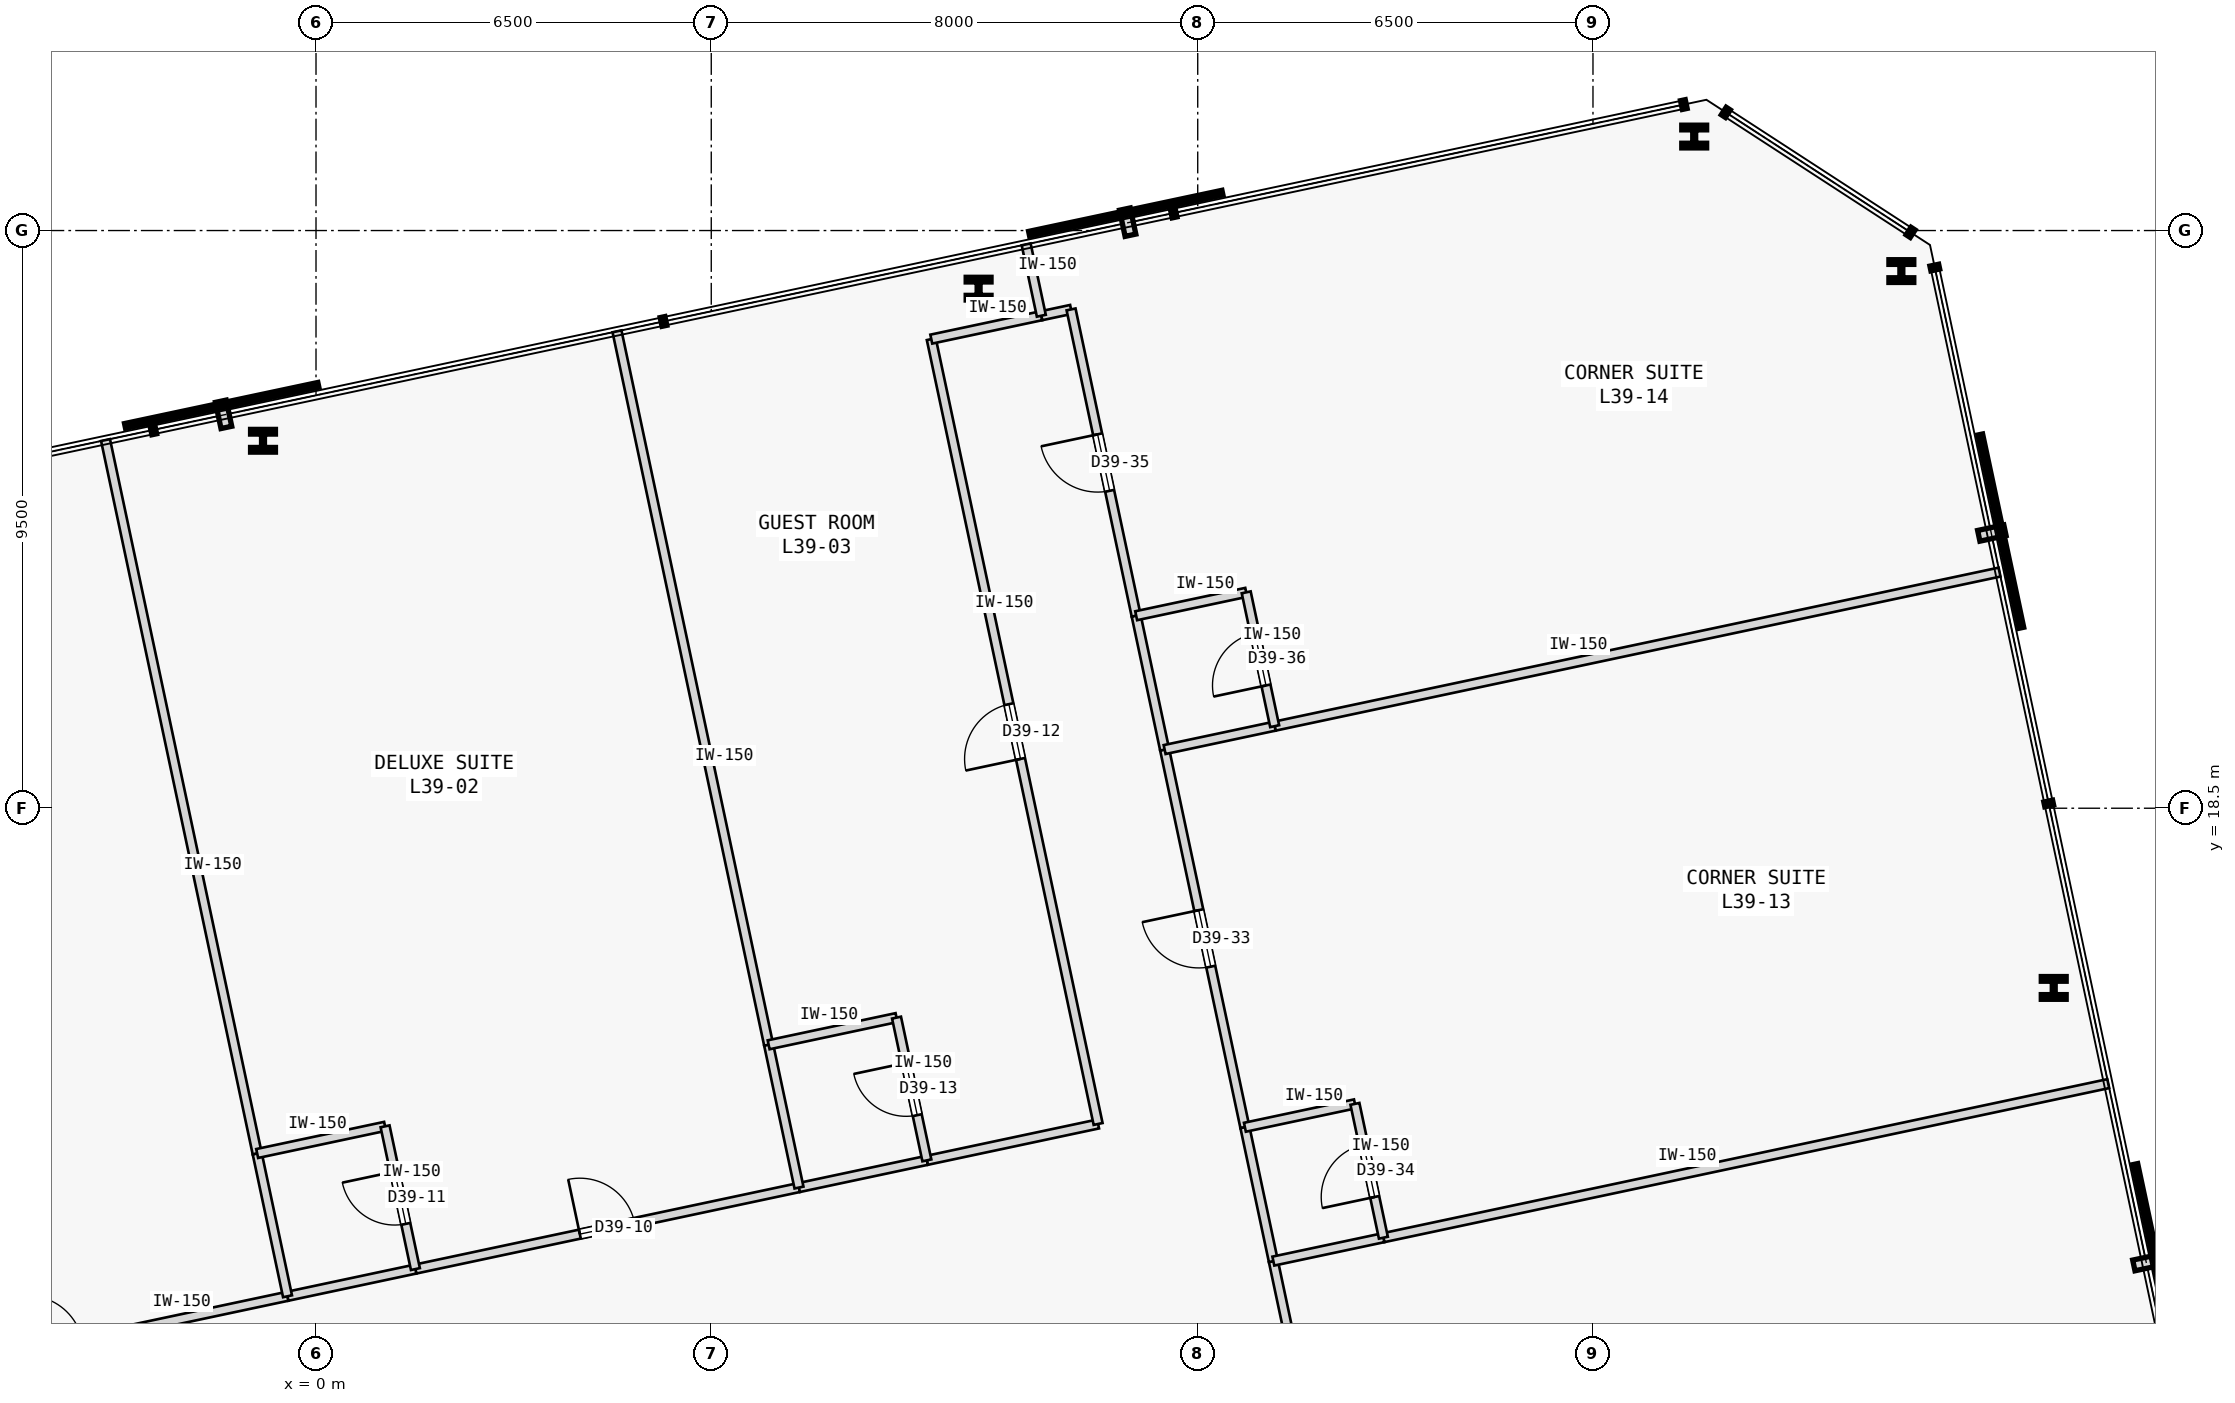
"""IFC4 building model, lengths in metres.
Left out: names, types, materials, properties, quantities, classifications, styles, units other than length and angle.
Written with IfcOpenShell. Run it as: python <this file> out.ifc"""

import sys

from ifc_helpers import new_model, si_unit, direction, frame, frame_2d, origin, origin_2d, place, context, subcontext, project, spatial, rectangle, i_section, extrude, element, fill, save


model = new_model("IFC4")
c1 = context("Model", 3, precision=1e-05, world=origin(), true_north=direction((0.0, 1.0)))
c2 = subcontext(c1, "Body", "Model", "MODEL_VIEW")
j1 = project(units=[si_unit("LENGTHUNIT", "METRE"), si_unit("PLANEANGLEUNIT", "RADIAN")], contexts=[c1])
p1 = place(None, origin())
s1 = spatial("IfcSite", under=j1, at=p1, CompositionType="ELEMENT")
p2 = place(p1, origin())
s2 = spatial("IfcBuilding", under=s1, at=p2, CompositionType="ELEMENT")
p3 = place(p2, frame((0.0, 0.0, 154.8)))
s3 = spatial("IfcBuildingStorey", under=s2, at=p3, CompositionType="ELEMENT", Elevation=154.8)
for number, where, z_axis, x_axis in (
    (1, (28.577, 15.545, 0.0), (0.0, 0.0, 1.0), (1.0, 0.0, 0.0)),
    (2, (26.071, 27.333, 0.0), (0.0, 0.0, 1.0), (1.0, 0.0, 0.0)),
    (3, (22.665, 29.546, 0.0), (0.0, 0.0, 1.0), (1.0, 0.0, 0.0)),
    (4, (10.896, 27.044, 0.0), (0.0, 0.0, 1.0), (1.0, 0.0, 0.0)),
    (5, (-0.872, 24.543, 0.0), (0.0, 0.0, 1.0), (1.0, 0.0, 0.0)),
):
    element("IfcColumn", number, at=place(p3, frame(where, z_axis=z_axis, x_axis=x_axis)), inside=s3, PredefinedType="COLUMN", context=c2, shape_type="SweptSolid", body=[
        extrude(i_section(OverallWidth=0.409, OverallDepth=0.374, WebThickness=0.048, FlangeThickness=0.077, FilletRadius=0.015, at=origin_2d()), origin(), (0.0, 0.0, 1.0), 3.4),
    ])
p4 = place(p3, frame((-8.121, 8.848, 0.0), z_axis=(0.0, 0.0, 1.0), x_axis=(0.978146318695, 0.207917722244, 0.0)))
e6 = element("IfcWall", 6, at=p4, inside=s3, PredefinedType="PARTITIONING", context=c2, shape_type="SweptSolid", body=[
    extrude(rectangle(XDim=7.824, YDim=0.15, at=frame_2d((3.912, 0.0))), origin(), (0.0, 0.0, 1.0), 3.175),
])
p5 = place(p4, frame((3.452, 0.0, 0.0)))
e7 = element("IfcOpeningElement", 7, at=p5, cuts=e6, PredefinedType="OPENING", context=c2, shape_type="SweptSolid", body=[
    extrude(rectangle(XDim=0.92, YDim=2.15, at=frame_2d((0.46, 1.075))), frame((0.0, 0.085, 0.0), z_axis=(0.0, -1.0, 0.0), x_axis=(1.0, 0.0, 0.0)), (0.0, 0.0, 1.0), 0.17),
])
p6 = place(p3, frame((1.635, 10.921, 0.0), z_axis=(0.0, 0.0, 1.0), x_axis=(0.978147881284, 0.207910370927, 0.0)))
e8 = element("IfcWall", 8, at=p6, inside=s3, PredefinedType="PARTITIONING", context=c2, shape_type="SweptSolid", body=[
    extrude(rectangle(XDim=6.449, YDim=0.15, at=frame_2d((3.225, 0.0))), origin(), (0.0, 0.0, 1.0), 3.175),
])
p7 = place(p6, frame((2.764, 0.0, 0.0)))
e9 = element("IfcOpeningElement", 9, at=p7, cuts=e8, PredefinedType="OPENING", context=c2, shape_type="SweptSolid", body=[
    extrude(rectangle(XDim=0.92, YDim=2.15, at=frame_2d((0.46, 1.075))), frame((0.0, 0.085, 0.0), z_axis=(0.0, -1.0, 0.0), x_axis=(1.0, 0.0, 0.0)), (0.0, 0.0, 1.0), 0.17),
])
p8 = place(p3, frame((-0.469, 10.474, 0.0), z_axis=(0.0, 0.0, 1.0), x_axis=(0.978146728319, 0.207915795165, 0.0)))
e10 = element("IfcWall", 10, at=p8, inside=s3, PredefinedType="PARTITIONING", context=c2, shape_type="SweptSolid", body=[
    extrude(rectangle(XDim=2.15, YDim=0.15, at=frame_2d((1.075, 0.0))), origin(), (0.0, 0.0, 1.0), 3.175),
])
p9 = place(p3, frame((10.046, 12.709, 0.0), z_axis=(0.0, 0.0, 1.0), x_axis=(0.97816208355, 0.207843542851, 0.0)))
e11 = element("IfcWall", 11, at=p9, inside=s3, PredefinedType="PARTITIONING", context=c2, shape_type="SweptSolid", body=[
    extrude(rectangle(XDim=2.879, YDim=0.15, at=frame_2d((1.439, 0.0))), origin(), (0.0, 0.0, 1.0), 3.175),
])
p10 = place(p3, frame((12.862, 13.308, 0.0), z_axis=(0.0, 0.0, 1.0), x_axis=(-0.207911421929, 0.978147657888, 0.0)))
e12 = element("IfcWall", 12, at=p10, inside=s3, PredefinedType="PARTITIONING", context=c2, shape_type="SweptSolid", body=[
    extrude(rectangle(XDim=13.195, YDim=0.15, at=frame_2d((6.598, 0.0))), origin(), (0.0, 0.0, 1.0), 3.175),
])
p11 = place(p10, frame((6.137, 0.0, 0.0)))
e13 = element("IfcOpeningElement", 13, at=p11, cuts=e12, PredefinedType="OPENING", context=c2, shape_type="SweptSolid", body=[
    extrude(rectangle(XDim=0.92, YDim=2.15, at=frame_2d((0.46, 1.075))), frame((0.0, 0.085, 0.0), z_axis=(0.0, -1.0, 0.0), x_axis=(1.0, 0.0, 0.0)), (0.0, 0.0, 1.0), 0.17),
])
p12 = place(p3, frame((10.118, 26.214, 0.0), z_axis=(0.0, 0.0, 1.0), x_axis=(0.978133353907, 0.20797870558, 0.0)))
e14 = element("IfcWall", 14, at=p12, inside=s3, PredefinedType="PARTITIONING", context=c2, shape_type="SweptSolid", body=[
    extrude(rectangle(XDim=1.85, YDim=0.15, at=frame_2d((0.925, 0.0))), origin(), (0.0, 0.0, 1.0), 3.175),
])
p13 = place(p3, frame((7.943, 12.262, 0.0), z_axis=(0.0, 0.0, 1.0), x_axis=(0.978146728319, 0.207915795165, 0.0)))
e15 = element("IfcWall", 15, at=p13, inside=s3, PredefinedType="PARTITIONING", context=c2, shape_type="SweptSolid", body=[
    extrude(rectangle(XDim=2.15, YDim=0.15, at=frame_2d((1.075, 0.0))), origin(), (0.0, 0.0, 1.0), 3.175),
])
p14 = place(p3, frame((17.064, 4.841, 0.0), z_axis=(0.0, 0.0, 1.0), x_axis=(-0.207924511115, 0.978144875608, 0.0)))
e16 = element("IfcWall", 16, at=p14, inside=s3, PredefinedType="PARTITIONING", context=c2, shape_type="SweptSolid", body=[
    extrude(rectangle(XDim=6.35, YDim=0.15, at=frame_2d((3.175, 0.0))), origin(), (0.0, 0.0, 1.0), 3.175),
])
p15 = place(p14, frame((2.7, 0.0, 0.0)))
e17 = element("IfcOpeningElement", 17, at=p15, cuts=e16, PredefinedType="OPENING", context=c2, shape_type="SweptSolid", body=[
    extrude(rectangle(XDim=0.95, YDim=2.15, at=frame_2d((0.475, 1.075))), frame((0.0, 0.085, 0.0), z_axis=(0.0, -1.0, 0.0), x_axis=(1.0, 0.0, 0.0)), (0.0, 0.0, 1.0), 0.17),
])
p16 = place(p3, frame((15.276, 13.253, 0.0), z_axis=(0.0, 0.0, 1.0), x_axis=(-0.207924511115, 0.978144875608, 0.0)))
e18 = element("IfcWall", 18, at=p16, inside=s3, PredefinedType="PARTITIONING", context=c2, shape_type="SweptSolid", body=[
    extrude(rectangle(XDim=6.35, YDim=0.15, at=frame_2d((3.175, 0.0))), origin(), (0.0, 0.0, 1.0), 3.175),
])
p17 = place(p16, frame((2.7, 0.0, 0.0)))
e19 = element("IfcOpeningElement", 19, at=p17, cuts=e18, PredefinedType="OPENING", context=c2, shape_type="SweptSolid", body=[
    extrude(rectangle(XDim=0.95, YDim=2.15, at=frame_2d((0.475, 1.075))), frame((0.0, 0.085, 0.0), z_axis=(0.0, -1.0, 0.0), x_axis=(1.0, 0.0, 0.0)), (0.0, 0.0, 1.0), 0.17),
])
p18 = place(p3, frame((15.744, 11.052, 0.0), z_axis=(0.0, 0.0, 1.0), x_axis=(-0.207891197838, 0.978151956427, 0.0)))
e20 = element("IfcWall", 20, at=p18, inside=s3, PredefinedType="PARTITIONING", context=c2, shape_type="SweptSolid", body=[
    extrude(rectangle(XDim=2.25, YDim=0.15, at=frame_2d((1.125, 0.0))), origin(), (0.0, 0.0, 1.0), 3.175),
])
p19 = place(p3, frame((11.928, 26.599, 0.0), z_axis=(0.0, 0.0, 1.0), x_axis=(0.97822210712, 0.207560856478, 0.0)))
e21 = element("IfcWall", 21, at=p19, inside=s3, PredefinedType="PARTITIONING", context=c2, shape_type="SweptSolid", body=[
    extrude(rectangle(XDim=0.5, YDim=0.15, at=frame_2d((0.25, 0.0))), origin(), (0.0, 0.0, 1.0), 3.175),
])
p20 = place(p3, frame((13.488, 21.666, 0.0), z_axis=(0.0, 0.0, 1.0), x_axis=(-0.207926226209, 0.978144511028, 0.0)))
e22 = element("IfcWall", 22, at=p20, inside=s3, PredefinedType="PARTITIONING", context=c2, shape_type="SweptSolid", body=[
    extrude(rectangle(XDim=5.15, YDim=0.15, at=frame_2d((2.575, 0.0))), origin(), (0.0, 0.0, 1.0), 3.175),
])
p21 = place(p20, frame((2.1, 0.0, 0.0)))
e23 = element("IfcOpeningElement", 23, at=p21, cuts=e22, PredefinedType="OPENING", context=c2, shape_type="SweptSolid", body=[
    extrude(rectangle(XDim=0.95, YDim=2.15, at=frame_2d((0.475, 1.075))), frame((0.0, 0.085, 0.0), z_axis=(0.0, -1.0, 0.0), x_axis=(1.0, 0.0, 0.0)), (0.0, 0.0, 1.0), 0.17),
])
p22 = place(p3, frame((13.956, 19.465, 0.0), z_axis=(0.0, 0.0, 1.0), x_axis=(-0.207891197838, 0.978151956427, 0.0)))
e24 = element("IfcWall", 24, at=p22, inside=s3, PredefinedType="PARTITIONING", context=c2, shape_type="SweptSolid", body=[
    extrude(rectangle(XDim=2.25, YDim=0.15, at=frame_2d((1.125, 0.0))), origin(), (0.0, 0.0, 1.0), 3.175),
])
p23 = place(p3, frame((-0.967, 12.822, 0.0), z_axis=(0.0, 0.0, 1.0), x_axis=(-0.207914988081, 0.978146899873, 0.0)))
e25 = element("IfcWall", 25, at=p23, inside=s3, PredefinedType="PARTITIONING", context=c2, shape_type="SweptSolid", body=[
    extrude(rectangle(XDim=11.995, YDim=0.15, at=frame_2d((5.998, 0.0))), origin(), (0.0, 0.0, 1.0), 3.175),
])
p24 = place(p3, frame((-0.469, 10.474, 0.0), z_axis=(0.0, 0.0, 1.0), x_axis=(-0.207819824493, 0.978167123015, 0.0)))
e26 = element("IfcWall", 26, at=p24, inside=s3, PredefinedType="PARTITIONING", context=c2, shape_type="SweptSolid", body=[
    extrude(rectangle(XDim=2.4, YDim=0.15, at=frame_2d((1.2, 0.0))), origin(), (0.0, 0.0, 1.0), 3.175),
])
p25 = place(p3, frame((-0.967, 12.822, 0.0), z_axis=(0.0, 0.0, 1.0), x_axis=(0.978169816376, 0.207807146966, 0.0)))
e27 = element("IfcWall", 27, at=p25, inside=s3, PredefinedType="PARTITIONING", context=c2, shape_type="SweptSolid", body=[
    extrude(rectangle(XDim=2.15, YDim=0.15, at=frame_2d((1.075, 0.0))), origin(), (0.0, 0.0, 1.0), 3.175),
])
p26 = place(p3, frame((1.635, 10.921, 0.0), z_axis=(0.0, 0.0, 1.0), x_axis=(-0.207840504985, 0.978162729042, 0.0)))
e28 = element("IfcWall", 28, at=p26, inside=s3, PredefinedType="PARTITIONING", context=c2, shape_type="SweptSolid", body=[
    extrude(rectangle(XDim=2.4, YDim=0.15, at=frame_2d((1.2, 0.0))), origin(), (0.0, 0.0, 1.0), 3.175),
])
p27 = place(p26, frame((0.76, 0.0, 0.0)))
e29 = element("IfcOpeningElement", 29, at=p27, cuts=e28, PredefinedType="OPENING", context=c2, shape_type="SweptSolid", body=[
    extrude(rectangle(XDim=0.88, YDim=2.15, at=frame_2d((0.44, 1.075))), frame((0.0, 0.085, 0.0), z_axis=(0.0, -1.0, 0.0), x_axis=(1.0, 0.0, 0.0)), (0.0, 0.0, 1.0), 0.17),
])
p28 = place(p3, frame((7.444, 14.61, 0.0), z_axis=(0.0, 0.0, 1.0), x_axis=(-0.207910848762, 0.978147779718, 0.0)))
e30 = element("IfcWall", 30, at=p28, inside=s3, PredefinedType="PARTITIONING", context=c2, shape_type="SweptSolid", body=[
    extrude(rectangle(XDim=11.995, YDim=0.15, at=frame_2d((5.998, 0.0))), origin(), (0.0, 0.0, 1.0), 3.175),
])
p29 = place(p3, frame((7.943, 12.262, 0.0), z_axis=(0.0, 0.0, 1.0), x_axis=(-0.207937840262, 0.978142042133, 0.0)))
e31 = element("IfcWall", 31, at=p29, inside=s3, PredefinedType="PARTITIONING", context=c2, shape_type="SweptSolid", body=[
    extrude(rectangle(XDim=2.4, YDim=0.15, at=frame_2d((1.2, 0.0))), origin(), (0.0, 0.0, 1.0), 3.175),
])
p30 = place(p3, frame((7.444, 14.61, 0.0), z_axis=(0.0, 0.0, 1.0), x_axis=(0.978151636287, 0.207892704126, 0.0)))
e32 = element("IfcWall", 32, at=p30, inside=s3, PredefinedType="PARTITIONING", context=c2, shape_type="SweptSolid", body=[
    extrude(rectangle(XDim=2.15, YDim=0.15, at=frame_2d((1.075, 0.0))), origin(), (0.0, 0.0, 1.0), 3.175),
])
p31 = place(p3, frame((10.046, 12.709, 0.0), z_axis=(0.0, 0.0, 1.0), x_axis=(-0.207840504985, 0.978162729042, 0.0)))
e33 = element("IfcWall", 33, at=p31, inside=s3, PredefinedType="PARTITIONING", context=c2, shape_type="SweptSolid", body=[
    extrude(rectangle(XDim=2.4, YDim=0.15, at=frame_2d((1.2, 0.0))), origin(), (0.0, 0.0, 1.0), 3.175),
])
p32 = place(p31, frame((0.76, 0.0, 0.0)))
e34 = element("IfcOpeningElement", 34, at=p32, cuts=e33, PredefinedType="OPENING", context=c2, shape_type="SweptSolid", body=[
    extrude(rectangle(XDim=0.88, YDim=2.15, at=frame_2d((0.44, 1.075))), frame((0.0, 0.085, 0.0), z_axis=(0.0, -1.0, 0.0), x_axis=(1.0, 0.0, 0.0)), (0.0, 0.0, 1.0), 0.17),
])
p33 = place(p3, frame((11.928, 26.599, 0.0), z_axis=(0.0, 0.0, 1.0), x_axis=(-0.20795853359, 0.978137642823, 0.0)))
e35 = element("IfcWall", 35, at=p33, inside=s3, PredefinedType="PARTITIONING", context=c2, shape_type="SweptSolid", body=[
    extrude(rectangle(XDim=1.2, YDim=0.15, at=frame_2d((0.6, 0.0))), origin(), (0.0, 0.0, 1.0), 3.175),
])
p34 = place(p3, frame((17.553, 11.437, 0.0), z_axis=(0.0, 0.0, 1.0), x_axis=(0.97814556055, 0.207921288896, 0.0)))
e36 = element("IfcWall", 36, at=p34, inside=s3, PredefinedType="PARTITIONING", context=c2, shape_type="SweptSolid", body=[
    extrude(rectangle(XDim=12.187, YDim=0.15, at=frame_2d((6.094, 0.0))), origin(), (0.0, 0.0, 1.0), 3.175),
])
for number, where, z_axis, x_axis in (
    (37, (15.744, 11.052, 0.0), (0.0, 0.0, 1.0), (0.978, 0.208, 0.0)),
    (38, (15.276, 13.253, 0.0), (0.0, 0.0, 1.0), (0.978, 0.208, 0.0)),
):
    element("IfcWall", number, at=place(p3, frame(where, z_axis=z_axis, x_axis=x_axis)), inside=s3, PredefinedType="PARTITIONING", context=c2, shape_type="SweptSolid", body=[
        extrude(rectangle(XDim=1.85, YDim=0.15, at=frame_2d((0.925, 0.0))), origin(), (0.0, 0.0, 1.0), 3.175),
    ])
p35 = place(p3, frame((17.553, 11.437, 0.0), z_axis=(0.0, 0.0, 1.0), x_axis=(-0.207891197838, 0.978151956427, 0.0)))
e39 = element("IfcWall", 39, at=p35, inside=s3, PredefinedType="PARTITIONING", context=c2, shape_type="SweptSolid", body=[
    extrude(rectangle(XDim=2.25, YDim=0.15, at=frame_2d((1.125, 0.0))), origin(), (0.0, 0.0, 1.0), 3.175),
])
p36 = place(p35, frame((0.685, 0.0, 0.0)))
e40 = element("IfcOpeningElement", 40, at=p36, cuts=e39, PredefinedType="OPENING", context=c2, shape_type="SweptSolid", body=[
    extrude(rectangle(XDim=0.88, YDim=2.15, at=frame_2d((0.44, 1.075))), frame((0.0, 0.085, 0.0), z_axis=(0.0, -1.0, 0.0), x_axis=(1.0, 0.0, 0.0)), (0.0, 0.0, 1.0), 0.17),
])
p37 = place(p3, frame((15.765, 19.849, 0.0), z_axis=(0.0, 0.0, 1.0), x_axis=(0.978149634612, 0.207902121941, 0.0)))
e41 = element("IfcWall", 41, at=p37, inside=s3, PredefinedType="PARTITIONING", context=c2, shape_type="SweptSolid", body=[
    extrude(rectangle(XDim=12.187, YDim=0.15, at=frame_2d((6.094, 0.0))), origin(), (0.0, 0.0, 1.0), 3.175),
])
for number, where, z_axis, x_axis in (
    (42, (13.956, 19.465, 0.0), (0.0, 0.0, 1.0), (0.978, 0.208, 0.0)),
    (43, (13.488, 21.666, 0.0), (0.0, 0.0, 1.0), (0.978, 0.208, 0.0)),
):
    element("IfcWall", number, at=place(p3, frame(where, z_axis=z_axis, x_axis=x_axis)), inside=s3, PredefinedType="PARTITIONING", context=c2, shape_type="SweptSolid", body=[
        extrude(rectangle(XDim=1.85, YDim=0.15, at=frame_2d((0.925, 0.0))), origin(), (0.0, 0.0, 1.0), 3.175),
    ])
p38 = place(p3, frame((15.765, 19.849, 0.0), z_axis=(0.0, 0.0, 1.0), x_axis=(-0.207891197838, 0.978151956427, 0.0)))
e44 = element("IfcWall", 44, at=p38, inside=s3, PredefinedType="PARTITIONING", context=c2, shape_type="SweptSolid", body=[
    extrude(rectangle(XDim=2.25, YDim=0.15, at=frame_2d((1.125, 0.0))), origin(), (0.0, 0.0, 1.0), 3.175),
])
p39 = place(p38, frame((0.685, 0.0, 0.0)))
e45 = element("IfcOpeningElement", 45, at=p39, cuts=e44, PredefinedType="OPENING", context=c2, shape_type="SweptSolid", body=[
    extrude(rectangle(XDim=0.88, YDim=2.15, at=frame_2d((0.44, 1.075))), frame((0.0, 0.085, 0.0), z_axis=(0.0, -1.0, 0.0), x_axis=(1.0, 0.0, 0.0)), (0.0, 0.0, 1.0), 0.17),
])
p40 = place(p7, origin())
e46 = element("IfcDoor", 46, at=p40, inside=s3, OperationType="SINGLE_SWING_LEFT", PredefinedType="DOOR", context=c2, shape_type="SweptSolid", body=[
    extrude(rectangle(XDim=0.92, YDim=2.15, at=frame_2d((0.46, 1.075))), frame((0.0, 0.025, 0.0), z_axis=(0.0, -1.0, 0.0), x_axis=(1.0, 0.0, 0.0)), (0.0, 0.0, 1.0), 0.05),
])
fill(e9, e46)
p41 = place(p27, origin())
e47 = element("IfcDoor", 47, at=p41, inside=s3, OperationType="SINGLE_SWING_RIGHT", PredefinedType="DOOR", context=c2, shape_type="SweptSolid", body=[
    extrude(rectangle(XDim=0.88, YDim=2.15, at=frame_2d((0.44, 1.075))), frame((0.0, 0.025, 0.0), z_axis=(0.0, -1.0, 0.0), x_axis=(1.0, 0.0, 0.0)), (0.0, 0.0, 1.0), 0.05),
])
fill(e29, e47)
p42 = place(p11, origin())
e48 = element("IfcDoor", 48, at=p42, inside=s3, OperationType="SINGLE_SWING_LEFT", PredefinedType="DOOR", context=c2, shape_type="SweptSolid", body=[
    extrude(rectangle(XDim=0.92, YDim=2.15, at=frame_2d((0.46, 1.075))), frame((0.0, 0.025, 0.0), z_axis=(0.0, -1.0, 0.0), x_axis=(1.0, 0.0, 0.0)), (0.0, 0.0, 1.0), 0.05),
])
fill(e13, e48)
p43 = place(p32, origin())
e49 = element("IfcDoor", 49, at=p43, inside=s3, OperationType="SINGLE_SWING_RIGHT", PredefinedType="DOOR", context=c2, shape_type="SweptSolid", body=[
    extrude(rectangle(XDim=0.88, YDim=2.15, at=frame_2d((0.44, 1.075))), frame((0.0, 0.025, 0.0), z_axis=(0.0, -1.0, 0.0), x_axis=(1.0, 0.0, 0.0)), (0.0, 0.0, 1.0), 0.05),
])
fill(e34, e49)
p44 = place(p17, origin())
e50 = element("IfcDoor", 50, at=p44, inside=s3, OperationType="SINGLE_SWING_RIGHT", PredefinedType="DOOR", context=c2, shape_type="SweptSolid", body=[
    extrude(rectangle(XDim=0.95, YDim=2.15, at=frame_2d((0.475, 1.075))), frame((0.0, 0.025, 0.0), z_axis=(0.0, -1.0, 0.0), x_axis=(1.0, 0.0, 0.0)), (0.0, 0.0, 1.0), 0.05),
])
fill(e19, e50)
p45 = place(p36, origin())
e51 = element("IfcDoor", 51, at=p45, inside=s3, OperationType="SINGLE_SWING_LEFT", PredefinedType="DOOR", context=c2, shape_type="SweptSolid", body=[
    extrude(rectangle(XDim=0.88, YDim=2.15, at=frame_2d((0.44, 1.075))), frame((0.0, 0.025, 0.0), z_axis=(0.0, -1.0, 0.0), x_axis=(1.0, 0.0, 0.0)), (0.0, 0.0, 1.0), 0.05),
])
fill(e40, e51)
p46 = place(p21, origin())
e52 = element("IfcDoor", 52, at=p46, inside=s3, OperationType="SINGLE_SWING_RIGHT", PredefinedType="DOOR", context=c2, shape_type="SweptSolid", body=[
    extrude(rectangle(XDim=0.95, YDim=2.15, at=frame_2d((0.475, 1.075))), frame((0.0, 0.025, 0.0), z_axis=(0.0, -1.0, 0.0), x_axis=(1.0, 0.0, 0.0)), (0.0, 0.0, 1.0), 0.05),
])
fill(e23, e52)
p47 = place(p39, origin())
e53 = element("IfcDoor", 53, at=p47, inside=s3, OperationType="SINGLE_SWING_LEFT", PredefinedType="DOOR", context=c2, shape_type="SweptSolid", body=[
    extrude(rectangle(XDim=0.88, YDim=2.15, at=frame_2d((0.44, 1.075))), frame((0.0, 0.025, 0.0), z_axis=(0.0, -1.0, 0.0), x_axis=(1.0, 0.0, 0.0)), (0.0, 0.0, 1.0), 0.05),
])
fill(e45, e53)
save(model, sys.argv[1])
